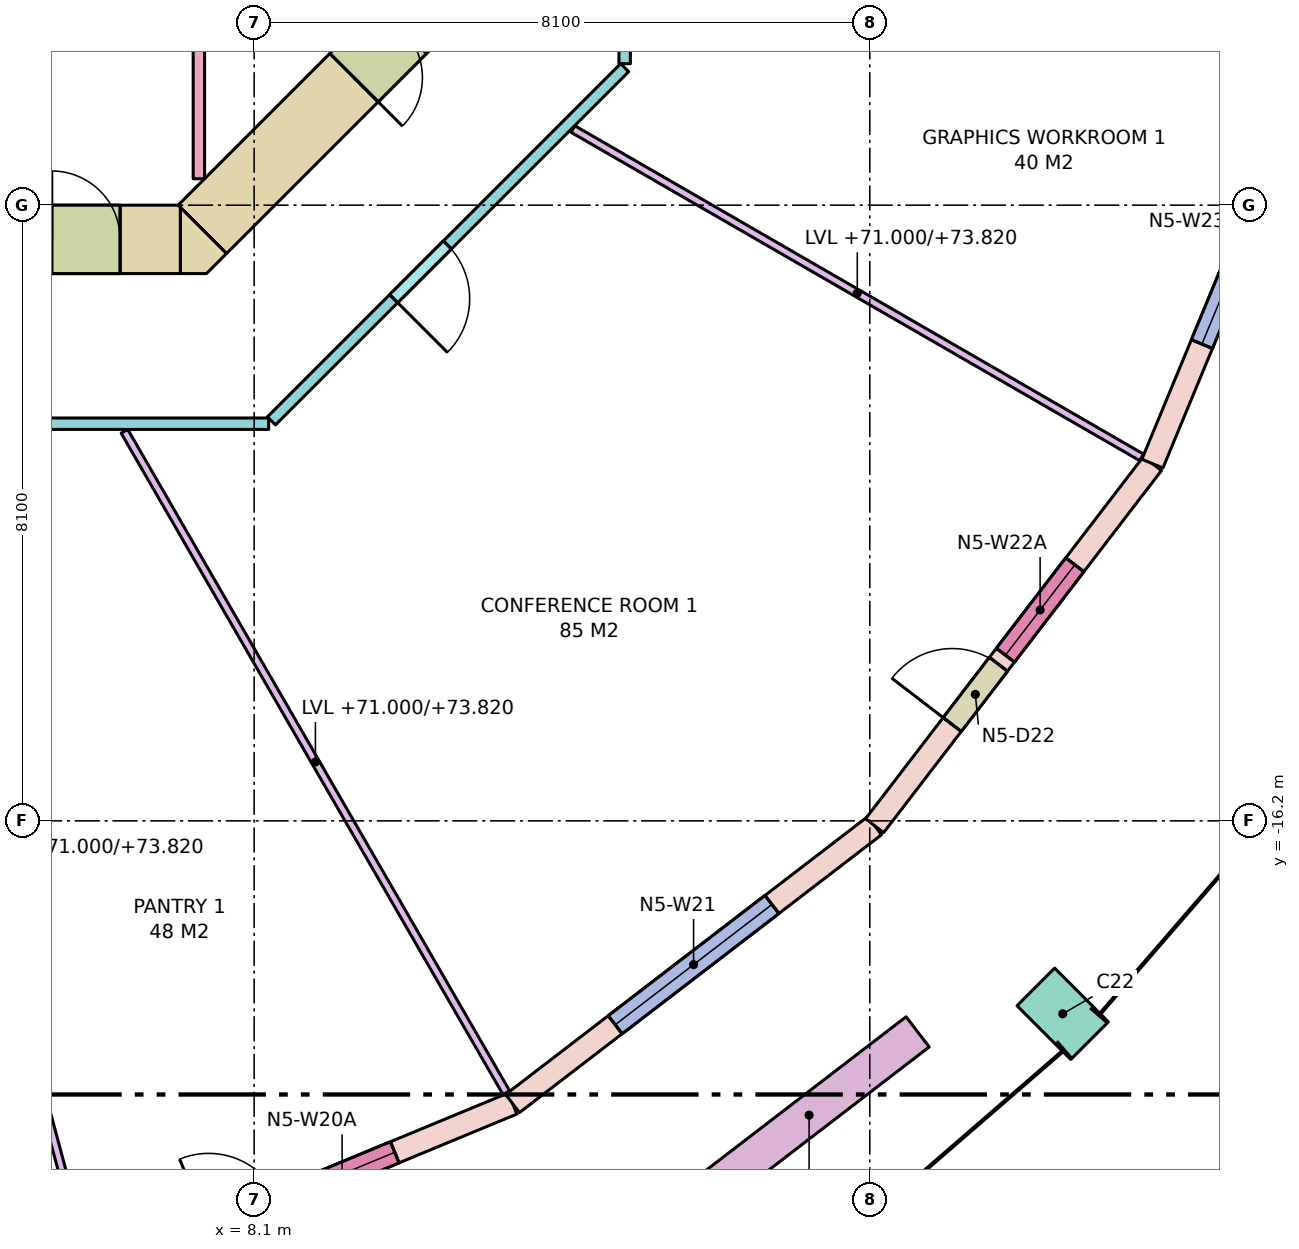
"""IFC4 building model, lengths in metres.
Left out: names, types, materials, properties, quantities, classifications, styles, units other than length and angle.
Written with IfcOpenShell. Run it as: python <this file> out.ifc"""

import sys

from ifc_helpers import new_model, si_unit, direction, frame, frame_2d, origin, origin_2d, place, context, subcontext, project, spatial, polyline, rectangle, outline, extrude, element, fill, save


model = new_model("IFC4")
c1 = context("Model", 3, precision=1e-05, world=origin(), true_north=direction((0.0, 1.0)))
c2 = subcontext(c1, "Body", "Model", "MODEL_VIEW")
j1 = project(units=[si_unit("LENGTHUNIT", "METRE"), si_unit("PLANEANGLEUNIT", "RADIAN")], contexts=[c1])
p1 = place(None, origin())
s1 = spatial("IfcSite", under=j1, at=p1, CompositionType="ELEMENT")
p2 = place(p1, origin())
s2 = spatial("IfcBuilding", under=s1, at=p2, CompositionType="ELEMENT")
p3 = place(p2, frame((0.0, 0.0, 71.0)))
s3 = spatial("IfcBuildingStorey", under=s2, at=p3, CompositionType="ELEMENT", Elevation=71.0)
p4 = place(p3, frame((18.738, -18.738, 0.0), z_axis=(0.0, 0.0, 1.0), x_axis=(0.707106781187, 0.707106781187, 0.0)))
e1 = element("IfcColumn", 1, at=p4, inside=s3, PredefinedType="COLUMN", context=c2, shape_type="SweptSolid", body=[
    extrude(rectangle(XDim=0.7, YDim=1.0, at=origin_2d()), origin(), (0.0, 0.0, 1.0), 4.0),
])
p5 = place(p3, frame((-7.13, -8.55, -0.28), z_axis=(0.0, 0.0, 1.0), x_axis=(1.0, 0.0, 0.0)))
e2 = element("IfcWall", 2, at=p5, inside=s3, PredefinedType="SHEAR", context=c2, shape_type="SweptSolid", body=[
    extrude(rectangle(XDim=14.26, YDim=0.9, at=frame_2d((7.13, 0.0))), origin(), (0.0, 0.0, 1.0), 4.0),
])
p6 = place(p5, frame((8.08, 0.0, 0.28)))
e3 = element("IfcOpeningElement", 3, at=p6, cuts=e2, PredefinedType="OPENING", context=c2, shape_type="SweptSolid", body=[
    extrude(rectangle(XDim=0.7, YDim=2.1, at=frame_2d((0.35, 1.05))), frame((0.0, 0.46, 0.0), z_axis=(0.0, -1.0, 0.0), x_axis=(1.0, 0.0, 0.0)), (0.0, 0.0, 1.0), 0.92),
])
p7 = place(p5, frame((5.58, 0.0, 0.28)))
e4 = element("IfcOpeningElement", 4, at=p7, cuts=e2, PredefinedType="OPENING", context=c2, shape_type="SweptSolid", body=[
    extrude(rectangle(XDim=0.85, YDim=2.1, at=frame_2d((0.425, 1.05))), frame((0.0, 0.46, 0.0), z_axis=(0.0, -1.0, 0.0), x_axis=(1.0, 0.0, 0.0)), (0.0, 0.0, 1.0), 0.92),
])
p8 = place(p5, frame((6.88, 0.0, 0.28)))
e5 = element("IfcOpeningElement", 5, at=p8, cuts=e2, PredefinedType="OPENING", context=c2, shape_type="SweptSolid", body=[
    extrude(rectangle(XDim=0.85, YDim=2.1, at=frame_2d((0.425, 1.05))), frame((0.0, 0.46, 0.0), z_axis=(0.0, -1.0, 0.0), x_axis=(1.0, 0.0, 0.0)), (0.0, 0.0, 1.0), 0.92),
])
p9 = place(p5, frame((9.967, 0.0, 0.28)))
e6 = element("IfcOpeningElement", 6, at=p9, cuts=e2, PredefinedType="OPENING", context=c2, shape_type="SweptSolid", body=[
    extrude(rectangle(XDim=0.9, YDim=2.1, at=frame_2d((0.45, 1.05))), frame((0.0, 0.46, 0.0), z_axis=(0.0, -1.0, 0.0), x_axis=(1.0, 0.0, 0.0)), (0.0, 0.0, 1.0), 0.92),
])
p10 = place(p5, frame((12.567, 0.0, 0.28)))
e7 = element("IfcOpeningElement", 7, at=p10, cuts=e2, PredefinedType="OPENING", context=c2, shape_type="SweptSolid", body=[
    extrude(rectangle(XDim=0.9, YDim=2.1, at=frame_2d((0.45, 1.05))), frame((0.0, 0.46, 0.0), z_axis=(0.0, -1.0, 0.0), x_axis=(1.0, 0.0, 0.0)), (0.0, 0.0, 1.0), 0.92),
])
p11 = place(p3, frame((10.418, -5.418, -0.28), z_axis=(0.0, 0.0, 1.0), x_axis=(-0.707106781187, -0.707106781187, 0.0)))
e8 = element("IfcWall", 8, at=p11, inside=s3, PredefinedType="SHEAR", context=c2, shape_type="SweptSolid", body=[
    extrude(rectangle(XDim=4.243, YDim=0.9, at=frame_2d((2.121, 0.0))), origin(), (0.0, 0.0, 1.0), 4.0),
])
p12 = place(p11, frame((0.52, 0.0, 0.28)))
e9 = element("IfcOpeningElement", 9, at=p12, cuts=e8, PredefinedType="OPENING", context=c2, shape_type="SweptSolid", body=[
    extrude(rectangle(XDim=0.9, YDim=2.1, at=frame_2d((0.45, 1.05))), frame((0.0, 0.46, 0.0), z_axis=(0.0, -1.0, 0.0), x_axis=(1.0, 0.0, 0.0)), (0.0, 0.0, 1.0), 0.92),
])
p13 = place(p3, frame((0.0, 0.0, -0.28)))
e10 = element("IfcWall", 10, at=p13, inside=s3, PredefinedType="SHEAR", context=c2, shape_type="SweptSolid", body=[
    extrude(outline(polyline([(7.473, -9.0), (7.13, -9.0), (7.13, -8.13), (7.736, -8.736), (7.473, -9.0)])), origin(), (0.0, 0.0, 1.0), 4.0),
])
p14 = place(p3, frame((5.953, -22.216, 0.0), z_axis=(0.0, 0.0, 1.0), x_axis=(0.923884511653, 0.382671411433, 0.0)))
e11 = element("IfcWall", 11, at=p14, inside=s3, PredefinedType="STANDARD", context=c2, shape_type="SweptSolid", body=[
    extrude(rectangle(XDim=6.004, YDim=0.3, at=frame_2d((3.002, 0.0))), origin(), (0.0, 0.0, 1.0), 3.72),
])
p15 = place(p14, frame((1.677, 0.0, 0.0)))
e12 = element("IfcOpeningElement", 12, at=p15, cuts=e11, PredefinedType="OPENING", context=c2, shape_type="SweptSolid", body=[
    extrude(rectangle(XDim=1.0, YDim=2.4, at=frame_2d((0.5, 1.2))), frame((0.0, 0.16, 0.0), z_axis=(0.0, -1.0, 0.0), x_axis=(1.0, 0.0, 0.0)), (0.0, 0.0, 1.0), 0.32),
])
p16 = place(p14, frame((2.827, 0.0, 0.8)))
e13 = element("IfcOpeningElement", 13, at=p16, cuts=e11, PredefinedType="OPENING", context=c2, shape_type="SweptSolid", body=[
    extrude(rectangle(XDim=1.5, YDim=2.7, at=frame_2d((0.75, 1.35))), frame((0.0, 0.16, 0.0), z_axis=(0.0, -1.0, 0.0), x_axis=(1.0, 0.0, 0.0)), (0.0, 0.0, 1.0), 0.32),
])
p17 = place(p3, frame((11.5, -19.919, 0.0), z_axis=(0.0, 0.0, 1.0), x_axis=(0.793339924758, 0.608778912074, 0.0)))
e14 = element("IfcWall", 14, at=p17, inside=s3, PredefinedType="STANDARD", context=c2, shape_type="SweptSolid", body=[
    extrude(rectangle(XDim=6.004, YDim=0.3, at=frame_2d((3.002, 0.0))), origin(), (0.0, 0.0, 1.0), 3.72),
])
p18 = place(p17, frame((1.702, 0.0, 0.8)))
e15 = element("IfcOpeningElement", 15, at=p18, cuts=e14, PredefinedType="OPENING", context=c2, shape_type="SweptSolid", body=[
    extrude(rectangle(XDim=2.6, YDim=2.7, at=frame_2d((1.3, 1.35))), frame((0.0, 0.16, 0.0), z_axis=(0.0, -1.0, 0.0), x_axis=(1.0, 0.0, 0.0)), (0.0, 0.0, 1.0), 0.32),
])
p19 = place(p3, frame((16.263, -16.263, 0.0), z_axis=(0.0, 0.0, 1.0), x_axis=(0.608778912074, 0.793339924758, 0.0)))
e16 = element("IfcWall", 16, at=p19, inside=s3, PredefinedType="STANDARD", context=c2, shape_type="SweptSolid", body=[
    extrude(rectangle(XDim=6.004, YDim=0.3, at=frame_2d((3.002, 0.0))), origin(), (0.0, 0.0, 1.0), 3.72),
])
p20 = place(p19, frame((1.677, 0.0, 0.0)))
e17 = element("IfcOpeningElement", 17, at=p20, cuts=e16, PredefinedType="OPENING", context=c2, shape_type="SweptSolid", body=[
    extrude(rectangle(XDim=1.0, YDim=2.4, at=frame_2d((0.5, 1.2))), frame((0.0, 0.16, 0.0), z_axis=(0.0, -1.0, 0.0), x_axis=(1.0, 0.0, 0.0)), (0.0, 0.0, 1.0), 0.32),
])
p21 = place(p19, frame((2.827, 0.0, 0.8)))
e18 = element("IfcOpeningElement", 18, at=p21, cuts=e16, PredefinedType="OPENING", context=c2, shape_type="SweptSolid", body=[
    extrude(rectangle(XDim=1.5, YDim=2.7, at=frame_2d((0.75, 1.35))), frame((0.0, 0.16, 0.0), z_axis=(0.0, -1.0, 0.0), x_axis=(1.0, 0.0, 0.0)), (0.0, 0.0, 1.0), 0.32),
])
p22 = place(p3, frame((19.919, -11.5, 0.0), z_axis=(0.0, 0.0, 1.0), x_axis=(0.382671411433, 0.923884511653, 0.0)))
e19 = element("IfcWall", 19, at=p22, inside=s3, PredefinedType="STANDARD", context=c2, shape_type="SweptSolid", body=[
    extrude(rectangle(XDim=6.004, YDim=0.3, at=frame_2d((3.002, 0.0))), origin(), (0.0, 0.0, 1.0), 3.72),
])
p23 = place(p22, frame((1.702, 0.0, 0.8)))
e20 = element("IfcOpeningElement", 20, at=p23, cuts=e19, PredefinedType="OPENING", context=c2, shape_type="SweptSolid", body=[
    extrude(rectangle(XDim=2.6, YDim=2.7, at=frame_2d((1.3, 1.35))), frame((0.0, 0.16, 0.0), z_axis=(0.0, -1.0, 0.0), x_axis=(1.0, 0.0, 0.0)), (0.0, 0.0, 1.0), 0.32),
])
p24 = place(p3, frame((13.974, -21.167, 0.0), z_axis=(0.0, 0.0, 1.0), x_axis=(0.793359599829, 0.608753271334, 0.0)))
e21 = element("IfcWall", 21, at=p24, inside=s3, PredefinedType="PARAPET", context=c2, shape_type="SweptSolid", body=[
    extrude(rectangle(XDim=3.6, YDim=0.5, at=frame_2d((1.8, 0.0))), origin(), (0.0, 0.0, 1.0), 0.9),
])
p25 = place(p3, frame((7.373, -7.752, 0.0), z_axis=(0.0, 0.0, 1.0), x_axis=(0.0, 1.0, 0.0)))
e22 = element("IfcWall", 22, at=p25, inside=s3, PredefinedType="PARTITIONING", context=c2, shape_type="SweptSolid", body=[
    extrude(rectangle(XDim=3.252, YDim=0.15, at=frame_2d((1.626, 0.0))), origin(), (0.0, 0.0, 1.0), 3.72),
])
p26 = place(p3, frame((12.975, -3.477, 0.0), z_axis=(0.0, 0.0, 1.0), x_axis=(0.0, -1.0, 0.0)))
e23 = element("IfcWall", 23, at=p26, inside=s3, PredefinedType="PARTITIONING", context=c2, shape_type="SweptSolid", body=[
    extrude(rectangle(XDim=2.762, YDim=0.15, at=frame_2d((1.381, 0.0))), origin(), (0.0, 0.0, 1.0), 2.82),
])
p27 = place(p26, frame((0.931, 0.0, 0.0)))
e24 = element("IfcOpeningElement", 24, at=p27, cuts=e23, PredefinedType="OPENING", context=c2, shape_type="SweptSolid", body=[
    extrude(rectangle(XDim=0.9, YDim=2.1, at=frame_2d((0.45, 1.05))), frame((0.0, 0.085, 0.0), z_axis=(0.0, -1.0, 0.0), x_axis=(1.0, 0.0, 0.0)), (0.0, 0.0, 1.0), 0.17),
])
p28 = place(p3, frame((12.975, -6.291, 0.0), z_axis=(0.0, 0.0, 1.0), x_axis=(-0.707125355289, -0.707088206597, 0.0)))
e25 = element("IfcWall", 25, at=p28, inside=s3, PredefinedType="PARTITIONING", context=c2, shape_type="SweptSolid", body=[
    extrude(rectangle(XDim=6.572, YDim=0.15, at=frame_2d((3.286, 0.0))), origin(), (0.0, 0.0, 1.0), 2.82),
])
p29 = place(p28, frame((3.298, 0.0, 0.0)))
e26 = element("IfcOpeningElement", 26, at=p29, cuts=e25, PredefinedType="OPENING", context=c2, shape_type="SweptSolid", body=[
    extrude(rectangle(XDim=1.0, YDim=2.1, at=frame_2d((0.5, 1.05))), frame((0.0, 0.085, 0.0), z_axis=(0.0, -1.0, 0.0), x_axis=(1.0, 0.0, 0.0)), (0.0, 0.0, 1.0), 0.17),
])
p30 = place(p3, frame((8.291, -10.975, 0.0), z_axis=(0.0, 0.0, 1.0), x_axis=(-1.0, 0.0, 0.0)))
e27 = element("IfcWall", 27, at=p30, inside=s3, PredefinedType="PARTITIONING", context=c2, shape_type="SweptSolid", body=[
    extrude(rectangle(XDim=7.016, YDim=0.15, at=frame_2d((3.508, 0.0))), origin(), (0.0, 0.0, 1.0), 2.82),
])
p31 = place(p30, frame((3.198, 0.0, 0.0)))
e28 = element("IfcOpeningElement", 28, at=p31, cuts=e27, PredefinedType="OPENING", context=c2, shape_type="SweptSolid", body=[
    extrude(rectangle(XDim=0.9, YDim=2.1, at=frame_2d((0.45, 1.05))), frame((0.0, 0.085, 0.0), z_axis=(0.0, -1.0, 0.0), x_axis=(1.0, 0.0, 0.0)), (0.0, 0.0, 1.0), 0.17),
])
p32 = place(p3, frame((2.965, -11.064, 0.0), z_axis=(0.0, 0.0, 1.0), x_axis=(0.258827930947, -0.965923445291, 0.0)))
e29 = element("IfcWall", 29, at=p32, inside=s3, PredefinedType="PARTITIONING", context=c2, shape_type="SweptSolid", body=[
    extrude(rectangle(XDim=11.382, YDim=0.1, at=frame_2d((5.691, 0.0))), origin(), (0.0, 0.0, 1.0), 2.82),
])
p33 = place(p3, frame((6.394, -11.075, 0.0), z_axis=(0.0, 0.0, 1.0), x_axis=(0.500024592647, -0.866011204747, 0.0)))
e30 = element("IfcWall", 30, at=p33, inside=s3, PredefinedType="PARTITIONING", context=c2, shape_type="SweptSolid", body=[
    extrude(rectangle(XDim=10.049, YDim=0.1, at=frame_2d((5.024, 0.0))), origin(), (0.0, 0.0, 1.0), 2.82),
])
p34 = place(p3, frame((12.294, -7.098, 0.0), z_axis=(0.0, 0.0, 1.0), x_axis=(0.866010547425, -0.500025731086, 0.0)))
e31 = element("IfcWall", 31, at=p34, inside=s3, PredefinedType="PARTITIONING", context=c2, shape_type="SweptSolid", body=[
    extrude(rectangle(XDim=8.641, YDim=0.1, at=frame_2d((4.32, 0.0))), origin(), (0.0, 0.0, 1.0), 2.82),
])
p35 = place(p16, origin())
e32 = element("IfcWindow", 32, at=p35, inside=s3, PartitioningType="SINGLE_PANEL", PredefinedType="WINDOW", context=c2, shape_type="SweptSolid", body=[
    extrude(rectangle(XDim=1.5, YDim=2.7, at=frame_2d((0.75, 1.35))), frame((0.0, 0.03, 0.0), z_axis=(0.0, -1.0, 0.0), x_axis=(1.0, 0.0, 0.0)), (0.0, 0.0, 1.0), 0.06),
])
fill(e13, e32)
p36 = place(p18, origin())
e33 = element("IfcWindow", 33, at=p36, inside=s3, PartitioningType="SINGLE_PANEL", PredefinedType="WINDOW", context=c2, shape_type="SweptSolid", body=[
    extrude(rectangle(XDim=2.6, YDim=2.7, at=frame_2d((1.3, 1.35))), frame((0.0, 0.03, 0.0), z_axis=(0.0, -1.0, 0.0), x_axis=(1.0, 0.0, 0.0)), (0.0, 0.0, 1.0), 0.06),
])
fill(e15, e33)
p37 = place(p20, origin())
e34 = element("IfcDoor", 34, at=p37, inside=s3, OperationType="SINGLE_SWING_LEFT", PredefinedType="DOOR", context=c2, shape_type="SweptSolid", body=[
    extrude(rectangle(XDim=1.0, YDim=2.4, at=frame_2d((0.5, 1.2))), frame((0.0, 0.025, 0.0), z_axis=(0.0, -1.0, 0.0), x_axis=(1.0, 0.0, 0.0)), (0.0, 0.0, 1.0), 0.05),
])
fill(e17, e34)
p38 = place(p21, origin())
e35 = element("IfcWindow", 35, at=p38, inside=s3, PartitioningType="SINGLE_PANEL", PredefinedType="WINDOW", context=c2, shape_type="SweptSolid", body=[
    extrude(rectangle(XDim=1.5, YDim=2.7, at=frame_2d((0.75, 1.35))), frame((0.0, 0.03, 0.0), z_axis=(0.0, -1.0, 0.0), x_axis=(1.0, 0.0, 0.0)), (0.0, 0.0, 1.0), 0.06),
])
fill(e18, e35)
p39 = place(p23, origin())
e36 = element("IfcWindow", 36, at=p39, inside=s3, PartitioningType="SINGLE_PANEL", PredefinedType="WINDOW", context=c2, shape_type="SweptSolid", body=[
    extrude(rectangle(XDim=2.6, YDim=2.7, at=frame_2d((1.3, 1.35))), frame((0.0, 0.03, 0.0), z_axis=(0.0, -1.0, 0.0), x_axis=(1.0, 0.0, 0.0)), (0.0, 0.0, 1.0), 0.06),
])
fill(e20, e36)
p40 = place(p10, origin())
e37 = element("IfcDoor", 37, at=p40, inside=s3, OperationType="SINGLE_SWING_LEFT", PredefinedType="DOOR", context=c2, shape_type="SweptSolid", body=[
    extrude(rectangle(XDim=0.9, YDim=2.1, at=frame_2d((0.45, 1.05))), frame((0.0, 0.025, 0.0), z_axis=(0.0, -1.0, 0.0), x_axis=(1.0, 0.0, 0.0)), (0.0, 0.0, 1.0), 0.05),
])
fill(e7, e37)
p41 = place(p12, origin())
e38 = element("IfcDoor", 38, at=p41, inside=s3, OperationType="SINGLE_SWING_RIGHT", PredefinedType="DOOR", context=c2, shape_type="SweptSolid", body=[
    extrude(rectangle(XDim=0.9, YDim=2.1, at=frame_2d((0.45, 1.05))), frame((0.0, 0.025, 0.0), z_axis=(0.0, -1.0, 0.0), x_axis=(1.0, 0.0, 0.0)), (0.0, 0.0, 1.0), 0.05),
])
fill(e9, e38)
p42 = place(p29, origin())
e39 = element("IfcDoor", 39, at=p42, inside=s3, OperationType="SINGLE_SWING_RIGHT", PredefinedType="DOOR", context=c2, shape_type="SweptSolid", body=[
    extrude(rectangle(XDim=1.0, YDim=2.1, at=frame_2d((0.5, 1.05))), frame((0.0, 0.025, 0.0), z_axis=(0.0, -1.0, 0.0), x_axis=(1.0, 0.0, 0.0)), (0.0, 0.0, 1.0), 0.05),
])
fill(e26, e39)
save(model, sys.argv[1])
